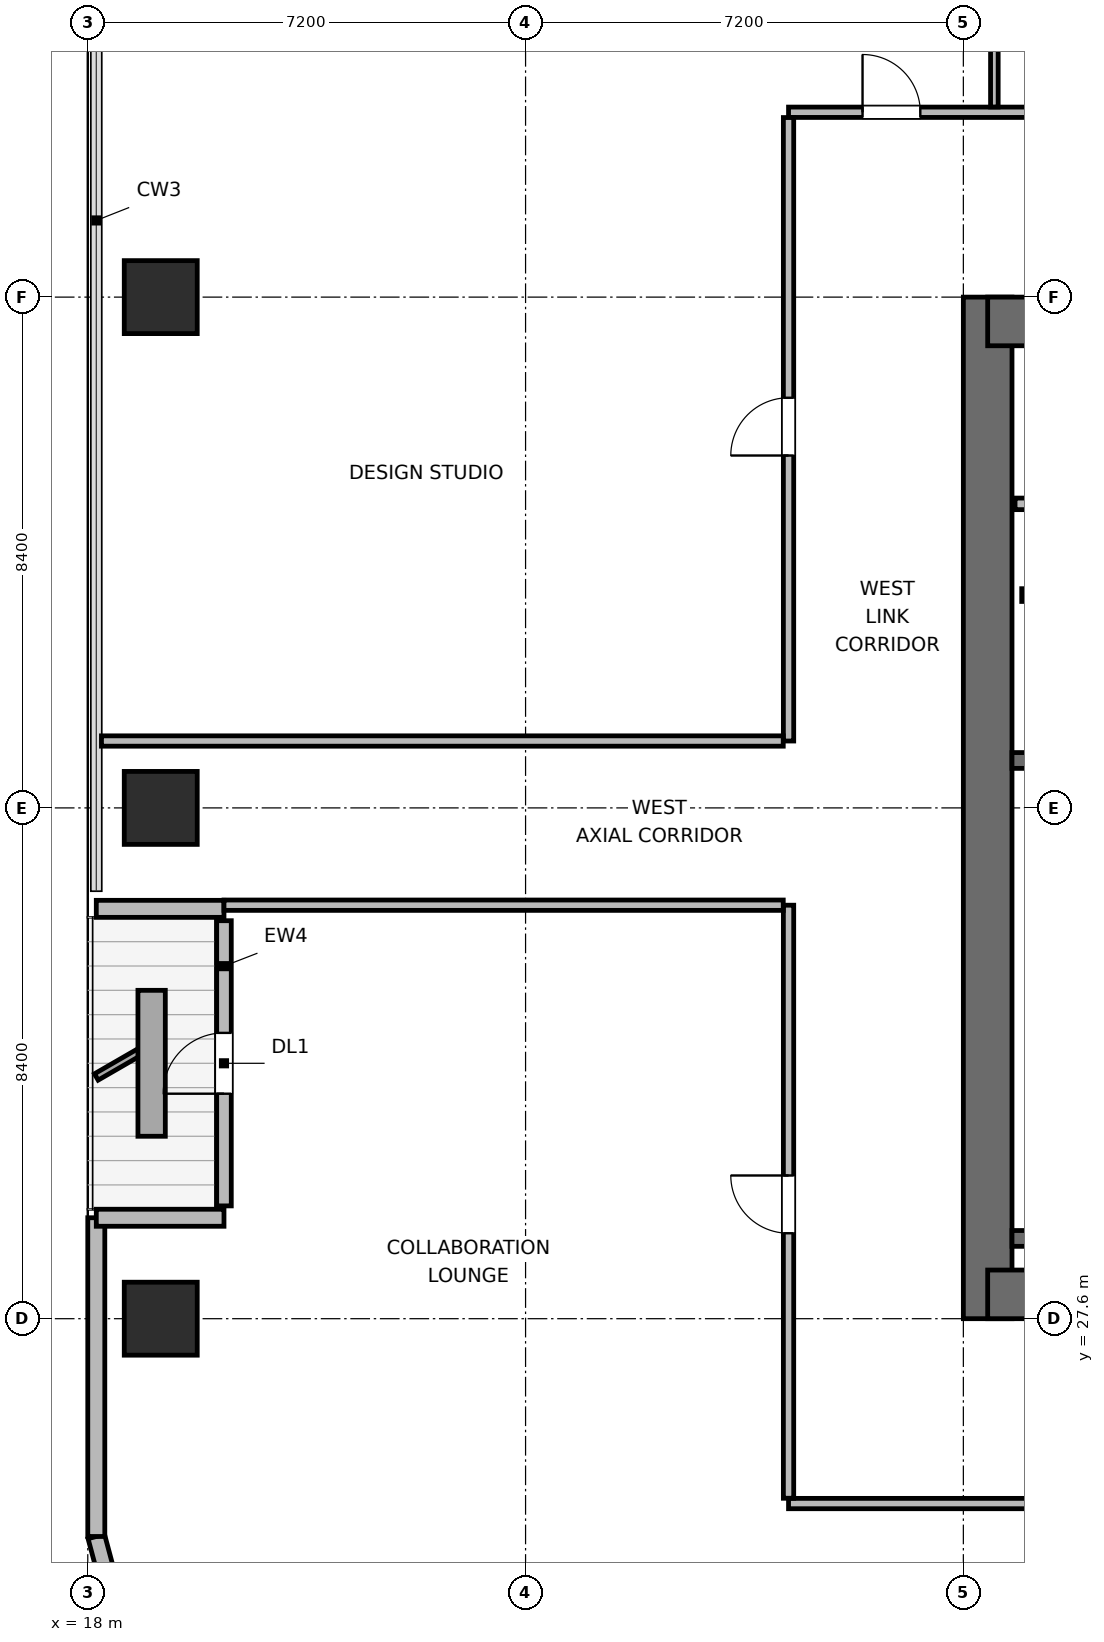
"""IFC4 building model, lengths in metres.
Left out: names, types, materials, properties, quantities, classifications, styles, units other than length and angle.
Written with IfcOpenShell. Run it as: python <this file> out.ifc"""

import sys

from ifc_helpers import new_model, si_unit, direction, frame, frame_2d, origin, origin_2d, place, context, subcontext, project, spatial, rectangle, extrude, element, fill, save


model = new_model("IFC4")
c1 = context("Model", 3, precision=1e-05, world=origin(), true_north=direction((0.0, 1.0)))
c2 = subcontext(c1, "Body", "Model", "MODEL_VIEW")
j1 = project(units=[si_unit("LENGTHUNIT", "METRE"), si_unit("PLANEANGLEUNIT", "RADIAN")], contexts=[c1])
p1 = place(None, origin())
s1 = spatial("IfcSite", under=j1, at=p1, CompositionType="ELEMENT")
p2 = place(p1, origin())
s2 = spatial("IfcBuilding", under=s1, at=p2, CompositionType="ELEMENT")
p3 = place(p2, frame((0.0, 0.0, 177.9)))
s3 = spatial("IfcBuildingStorey", under=s2, at=p3, CompositionType="ELEMENT", Elevation=177.9)
p4 = place(p3, frame((32.8, 27.6, 0.0), z_axis=(0.0, 0.0, 1.0), x_axis=(0.0, 1.0, 0.0)))
e1 = element("IfcWall", 1, at=p4, inside=s3, PredefinedType="SHEAR", context=c2, shape_type="SweptSolid", body=[
    extrude(rectangle(XDim=16.8, YDim=0.8, at=frame_2d((8.4, 0.0))), origin(), (0.0, 0.0, 1.0), 3.9),
])
p5 = place(p3, frame((32.8, 28.0, 0.0), z_axis=(0.0, 0.0, 1.0), x_axis=(1.0, 0.0, 0.0)))
e2 = element("IfcWall", 2, at=p5, inside=s3, PredefinedType="SHEAR", context=c2, shape_type="SweptSolid", body=[
    extrude(rectangle(XDim=9.2, YDim=0.8, at=frame_2d((4.6, 0.0))), origin(), (0.0, 0.0, 1.0), 3.9),
])
p6 = place(p5, frame((5.025, 0.0, 0.0)))
e3 = element("IfcOpeningElement", 3, at=p6, cuts=e2, PredefinedType="OPENING", context=c2, shape_type="SweptSolid", body=[
    extrude(rectangle(XDim=1.05, YDim=2.04, at=frame_2d((0.525, 1.02))), frame((0.0, 0.41, 0.0), z_axis=(0.0, -1.0, 0.0), x_axis=(1.0, 0.0, 0.0)), (0.0, 0.0, 1.0), 0.82),
])
p7 = place(p3, frame((32.8, 44.0, 0.0), z_axis=(0.0, 0.0, 1.0), x_axis=(1.0, 0.0, 0.0)))
e4 = element("IfcWall", 4, at=p7, inside=s3, PredefinedType="SHEAR", context=c2, shape_type="SweptSolid", body=[
    extrude(rectangle(XDim=9.2, YDim=0.8, at=frame_2d((4.6, 0.0))), origin(), (0.0, 0.0, 1.0), 3.9),
])
p8 = place(p7, frame((1.025, 0.0, 0.0)))
e5 = element("IfcOpeningElement", 5, at=p8, cuts=e4, PredefinedType="OPENING", context=c2, shape_type="SweptSolid", body=[
    extrude(rectangle(XDim=0.95, YDim=2.04, at=frame_2d((0.475, 1.02))), frame((0.0, 0.41, 0.0), z_axis=(0.0, -1.0, 0.0), x_axis=(1.0, 0.0, 0.0)), (0.0, 0.0, 1.0), 0.82),
])
p9 = place(p7, frame((4.275, 0.0, 0.0)))
e6 = element("IfcOpeningElement", 6, at=p9, cuts=e4, PredefinedType="OPENING", context=c2, shape_type="SweptSolid", body=[
    extrude(rectangle(XDim=0.9, YDim=2.02, at=frame_2d((0.45, 1.01))), frame((0.0, 0.41, 0.0), z_axis=(0.0, -1.0, 0.0), x_axis=(1.0, 0.0, 0.0)), (0.0, 0.0, 1.0), 0.82),
])
p10 = place(p7, frame((7.175, 0.0, 0.0)))
e7 = element("IfcOpeningElement", 7, at=p10, cuts=e4, PredefinedType="OPENING", context=c2, shape_type="SweptSolid", body=[
    extrude(rectangle(XDim=0.9, YDim=2.02, at=frame_2d((0.45, 1.01))), frame((0.0, 0.41, 0.0), z_axis=(0.0, -1.0, 0.0), x_axis=(1.0, 0.0, 0.0)), (0.0, 0.0, 1.0), 0.82),
])
for number, where, z_axis, x_axis in (
    (8, (33.2, 28.92, 0.0), (0.0, 0.0, 1.0), (1.0, 0.0, 0.0)),
    (9, (33.2, 36.78, 0.0), (0.0, 0.0, 1.0), (1.0, 0.0, 0.0)),
):
    element("IfcWall", number, at=place(p3, frame(where, z_axis=z_axis, x_axis=x_axis)), inside=s3, PredefinedType="SHEAR", context=c2, shape_type="SweptSolid", body=[
        extrude(rectangle(XDim=3.91, YDim=0.26, at=frame_2d((1.955, 0.0))), origin(), (0.0, 0.0, 1.0), 3.9),
    ])
for number, where, z_axis, x_axis in (
    (10, (19.2, 27.6, 0.0), (0.0, 0.0, 1.0), (1.0, 0.0, 0.0)),
    (11, (19.2, 36.0, 0.0), (0.0, 0.0, 1.0), (1.0, 0.0, 0.0)),
    (12, (19.2, 44.4, 0.0), (0.0, 0.0, 1.0), (1.0, 0.0, 0.0)),
):
    element("IfcColumn", number, at=place(p3, frame(where, z_axis=z_axis, x_axis=x_axis)), inside=s3, PredefinedType="COLUMN", context=c2, shape_type="SweptSolid", body=[
        extrude(rectangle(XDim=1.2, YDim=1.2, at=origin_2d()), origin(), (0.0, 0.0, 1.0), 3.9),
    ])
p11 = place(p3, frame((18.848, 21.373, 0.0), z_axis=(0.0, 0.0, 1.0), x_axis=(-0.258672222976, 0.9659651552, 0.0)))
e13 = element("IfcWall", 13, at=p11, inside=s3, PredefinedType="SOLIDWALL", context=c2, shape_type="SweptSolid", body=[
    extrude(rectangle(XDim=2.739, YDim=0.28, at=frame_2d((1.37, 0.0))), origin(), (0.0, 0.0, 1.0), 3.68),
])
p12 = place(p3, frame((18.14, 24.018, 0.0), z_axis=(0.0, 0.0, 1.0), x_axis=(0.0, 1.0, 0.0)))
e14 = element("IfcWall", 14, at=p12, inside=s3, PredefinedType="SOLIDWALL", context=c2, shape_type="SweptSolid", body=[
    extrude(rectangle(XDim=5.242, YDim=0.28, at=frame_2d((2.621, 0.0))), origin(), (0.0, 0.0, 1.0), 3.68),
])
p13 = place(p3, frame((18.14, 29.26, 0.0), z_axis=(0.0, 0.0, 1.0), x_axis=(1.0, 0.0, 0.0)))
e15 = element("IfcWall", 15, at=p13, inside=s3, PredefinedType="SOLIDWALL", context=c2, shape_type="SweptSolid", body=[
    extrude(rectangle(XDim=2.1, YDim=0.28, at=frame_2d((1.05, 0.0))), origin(), (0.0, 0.0, 1.0), 3.116),
])
p14 = place(p3, frame((20.24, 29.455, 0.0), z_axis=(0.0, 0.0, 1.0), x_axis=(0.0, 1.0, 0.0)))
e16 = element("IfcWall", 16, at=p14, inside=s3, PredefinedType="SOLIDWALL", context=c2, shape_type="SweptSolid", body=[
    extrude(rectangle(XDim=4.69, YDim=0.24, at=frame_2d((2.345, 0.0))), origin(), (0.0, 0.0, 1.0), 3.248),
])
p15 = place(p14, frame((1.845, 0.0, 0.0)))
e17 = element("IfcOpeningElement", 17, at=p15, cuts=e16, PredefinedType="OPENING", context=c2, shape_type="SweptSolid", body=[
    extrude(rectangle(XDim=1.0, YDim=2.02, at=frame_2d((0.5, 1.01))), frame((0.0, 0.13, 0.0), z_axis=(0.0, -1.0, 0.0), x_axis=(1.0, 0.0, 0.0)), (0.0, 0.0, 1.0), 0.26),
])
p16 = place(p3, frame((20.24, 34.34, 0.0), z_axis=(0.0, 0.0, 1.0), x_axis=(-1.0, 0.0, 0.0)))
e18 = element("IfcWall", 18, at=p16, inside=s3, PredefinedType="SOLIDWALL", context=c2, shape_type="SweptSolid", body=[
    extrude(rectangle(XDim=2.1, YDim=0.28, at=frame_2d((1.05, 0.0))), origin(), (0.0, 0.0, 1.0), 3.116),
])
p17 = place(p3, frame((33.25, 41.0, 0.0), z_axis=(0.0, 0.0, 1.0), x_axis=(1.0, 0.0, 0.0)))
e19 = element("IfcWall", 19, at=p17, inside=s3, PredefinedType="PLUMBINGWALL", context=c2, shape_type="SweptSolid", body=[
    extrude(rectangle(XDim=8.3, YDim=0.19, at=frame_2d((4.15, 0.0))), origin(), (0.0, 0.0, 1.0), 3.68),
])
p18 = place(p3, frame((33.36, 39.5, 0.0), z_axis=(0.0, 0.0, 1.0), x_axis=(1.0, 0.0, 0.0)))
e20 = element("IfcWall", 20, at=p18, inside=s3, PredefinedType="PARTITIONING", context=c2, shape_type="SweptSolid", body=[
    extrude(rectangle(XDim=1.86, YDim=0.21, at=frame_2d((0.93, 0.0))), origin(), (0.0, 0.0, 1.0), 3.68),
])
p19 = place(p3, frame((29.525, 24.56, 0.0), z_axis=(0.0, 0.0, 1.0), x_axis=(1.0, 0.0, 0.0)))
e21 = element("IfcWall", 21, at=p19, inside=s3, PredefinedType="PARTITIONING", context=c2, shape_type="SweptSolid", body=[
    extrude(rectangle(XDim=34.075, YDim=0.17, at=frame_2d((17.038, 0.0))), origin(), (0.0, 0.0, 1.0), 3.68),
])
p20 = place(p19, frame((5.403, 0.0, 0.0)))
e22 = element("IfcOpeningElement", 22, at=p20, cuts=e21, PredefinedType="OPENING", context=c2, shape_type="SweptSolid", body=[
    extrude(rectangle(XDim=0.95, YDim=2.04, at=frame_2d((0.475, 1.02))), frame((0.0, 0.095, 0.0), z_axis=(0.0, -1.0, 0.0), x_axis=(1.0, 0.0, 0.0)), (0.0, 0.0, 1.0), 0.19),
])
p21 = place(p19, frame((16.56, 0.0, 0.0)))
e23 = element("IfcOpeningElement", 23, at=p21, cuts=e21, PredefinedType="OPENING", context=c2, shape_type="SweptSolid", body=[
    extrude(rectangle(XDim=0.95, YDim=2.04, at=frame_2d((0.475, 1.02))), frame((0.0, 0.095, 0.0), z_axis=(0.0, -1.0, 0.0), x_axis=(1.0, 0.0, 0.0)), (0.0, 0.0, 1.0), 0.19),
])
p22 = place(p19, frame((27.72, 0.0, 0.0)))
e24 = element("IfcOpeningElement", 24, at=p22, cuts=e21, PredefinedType="OPENING", context=c2, shape_type="SweptSolid", body=[
    extrude(rectangle(XDim=0.95, YDim=2.04, at=frame_2d((0.475, 1.02))), frame((0.0, 0.095, 0.0), z_axis=(0.0, -1.0, 0.0), x_axis=(1.0, 0.0, 0.0)), (0.0, 0.0, 1.0), 0.19),
])
p23 = place(p3, frame((29.525, 47.44, 0.0), z_axis=(0.0, 0.0, 1.0), x_axis=(1.0, 0.0, 0.0)))
e25 = element("IfcWall", 25, at=p23, inside=s3, PredefinedType="PARTITIONING", context=c2, shape_type="SweptSolid", body=[
    extrude(rectangle(XDim=34.075, YDim=0.17, at=frame_2d((17.038, 0.0))), origin(), (0.0, 0.0, 1.0), 3.68),
])
p24 = place(p23, frame((1.217, 0.0, 0.0)))
e26 = element("IfcOpeningElement", 26, at=p24, cuts=e25, PredefinedType="OPENING", context=c2, shape_type="SweptSolid", body=[
    extrude(rectangle(XDim=0.95, YDim=2.04, at=frame_2d((0.475, 1.02))), frame((0.0, 0.095, 0.0), z_axis=(0.0, -1.0, 0.0), x_axis=(1.0, 0.0, 0.0)), (0.0, 0.0, 1.0), 0.19),
])
p25 = place(p23, frame((6.37, 0.0, 0.0)))
e27 = element("IfcOpeningElement", 27, at=p25, cuts=e25, PredefinedType="OPENING", context=c2, shape_type="SweptSolid", body=[
    extrude(rectangle(XDim=0.95, YDim=2.04, at=frame_2d((0.475, 1.02))), frame((0.0, 0.095, 0.0), z_axis=(0.0, -1.0, 0.0), x_axis=(1.0, 0.0, 0.0)), (0.0, 0.0, 1.0), 0.19),
])
p26 = place(p23, frame((12.01, 0.0, 0.0)))
e28 = element("IfcOpeningElement", 28, at=p26, cuts=e25, PredefinedType="OPENING", context=c2, shape_type="SweptSolid", body=[
    extrude(rectangle(XDim=0.95, YDim=2.04, at=frame_2d((0.475, 1.02))), frame((0.0, 0.095, 0.0), z_axis=(0.0, -1.0, 0.0), x_axis=(1.0, 0.0, 0.0)), (0.0, 0.0, 1.0), 0.19),
])
p27 = place(p23, frame((16.86, 0.0, 0.0)))
e29 = element("IfcOpeningElement", 29, at=p27, cuts=e25, PredefinedType="OPENING", context=c2, shape_type="SweptSolid", body=[
    extrude(rectangle(XDim=0.95, YDim=2.04, at=frame_2d((0.475, 1.02))), frame((0.0, 0.095, 0.0), z_axis=(0.0, -1.0, 0.0), x_axis=(1.0, 0.0, 0.0)), (0.0, 0.0, 1.0), 0.19),
])
p28 = place(p23, frame((20.965, 0.0, 0.0)))
e30 = element("IfcOpeningElement", 30, at=p28, cuts=e25, PredefinedType="OPENING", context=c2, shape_type="SweptSolid", body=[
    extrude(rectangle(XDim=0.95, YDim=2.04, at=frame_2d((0.475, 1.02))), frame((0.0, 0.095, 0.0), z_axis=(0.0, -1.0, 0.0), x_axis=(1.0, 0.0, 0.0)), (0.0, 0.0, 1.0), 0.19),
])
p29 = place(p23, frame((25.52, 0.0, 0.0)))
e31 = element("IfcOpeningElement", 31, at=p29, cuts=e25, PredefinedType="OPENING", context=c2, shape_type="SweptSolid", body=[
    extrude(rectangle(XDim=0.95, YDim=2.04, at=frame_2d((0.475, 1.02))), frame((0.0, 0.095, 0.0), z_axis=(0.0, -1.0, 0.0), x_axis=(1.0, 0.0, 0.0)), (0.0, 0.0, 1.0), 0.19),
])
p30 = place(p23, frame((31.12, 0.0, 0.0)))
e32 = element("IfcOpeningElement", 32, at=p30, cuts=e25, PredefinedType="OPENING", context=c2, shape_type="SweptSolid", body=[
    extrude(rectangle(XDim=0.95, YDim=2.04, at=frame_2d((0.475, 1.02))), frame((0.0, 0.095, 0.0), z_axis=(0.0, -1.0, 0.0), x_axis=(1.0, 0.0, 0.0)), (0.0, 0.0, 1.0), 0.19),
])
p31 = place(p3, frame((29.525, 24.647, 0.0), z_axis=(0.0, 0.0, 1.0), x_axis=(0.0, 1.0, 0.0)))
e33 = element("IfcWall", 33, at=p31, inside=s3, PredefinedType="PARTITIONING", context=c2, shape_type="SweptSolid", body=[
    extrude(rectangle(XDim=9.753, YDim=0.17, at=frame_2d((4.876, 0.0))), origin(), (0.0, 0.0, 1.0), 3.68),
])
p32 = place(p31, frame((4.358, 0.0, 0.0)))
e34 = element("IfcOpeningElement", 34, at=p32, cuts=e33, PredefinedType="OPENING", context=c2, shape_type="SweptSolid", body=[
    extrude(rectangle(XDim=0.95, YDim=2.04, at=frame_2d((0.475, 1.02))), frame((0.0, 0.095, 0.0), z_axis=(0.0, -1.0, 0.0), x_axis=(1.0, 0.0, 0.0)), (0.0, 0.0, 1.0), 0.19),
])
p33 = place(p3, frame((29.525, 37.1, 0.0), z_axis=(0.0, 0.0, 1.0), x_axis=(0.0, 1.0, 0.0)))
e35 = element("IfcWall", 35, at=p33, inside=s3, PredefinedType="PARTITIONING", context=c2, shape_type="SweptSolid", body=[
    extrude(rectangle(XDim=10.253, YDim=0.17, at=frame_2d((5.126, 0.0))), origin(), (0.0, 0.0, 1.0), 3.68),
])
p34 = place(p33, frame((4.695, 0.0, 0.0)))
e36 = element("IfcOpeningElement", 36, at=p34, cuts=e35, PredefinedType="OPENING", context=c2, shape_type="SweptSolid", body=[
    extrude(rectangle(XDim=0.95, YDim=2.04, at=frame_2d((0.475, 1.02))), frame((0.0, 0.095, 0.0), z_axis=(0.0, -1.0, 0.0), x_axis=(1.0, 0.0, 0.0)), (0.0, 0.0, 1.0), 0.19),
])
p35 = place(p3, frame((32.91, 47.527, 0.0), z_axis=(0.0, 0.0, 1.0), x_axis=(0.0, 1.0, 0.0)))
e37 = element("IfcWall", 37, at=p35, inside=s3, PredefinedType="PARTITIONING", context=c2, shape_type="SweptSolid", body=[
    extrude(rectangle(XDim=14.638, YDim=0.125, at=frame_2d((7.319, 0.0))), origin(), (0.0, 0.0, 1.0), 3.68),
])
p36 = place(p3, frame((20.24, 34.4, 0.0), z_axis=(0.0, 0.0, 1.0), x_axis=(1.0, 0.0, 0.0)))
e38 = element("IfcWall", 38, at=p36, inside=s3, PredefinedType="PARTITIONING", context=c2, shape_type="SweptSolid", body=[
    extrude(rectangle(XDim=9.198, YDim=0.17, at=frame_2d((4.599, 0.0))), origin(), (0.0, 0.0, 1.0), 3.68),
])
p37 = place(p3, frame((18.225, 37.1, 0.0), z_axis=(0.0, 0.0, 1.0), x_axis=(1.0, 0.0, 0.0)))
e39 = element("IfcWall", 39, at=p37, inside=s3, PredefinedType="PARTITIONING", context=c2, shape_type="SweptSolid", body=[
    extrude(rectangle(XDim=11.213, YDim=0.17, at=frame_2d((5.606, 0.0))), origin(), (0.0, 0.0, 1.0), 3.68),
])
p38 = place(p15, origin())
e40 = element("IfcDoor", 40, at=p38, inside=s3, OperationType="SINGLE_SWING_LEFT", PredefinedType="DOOR", context=c2, shape_type="SweptSolid", body=[
    extrude(rectangle(XDim=1.0, YDim=2.02, at=frame_2d((0.5, 1.01))), frame((0.0, 0.025, 0.0), z_axis=(0.0, -1.0, 0.0), x_axis=(1.0, 0.0, 0.0)), (0.0, 0.0, 1.0), 0.05),
])
fill(e17, e40)
p39 = place(p24, origin())
e41 = element("IfcDoor", 41, at=p39, inside=s3, OperationType="SINGLE_SWING_LEFT", PredefinedType="DOOR", context=c2, shape_type="SweptSolid", body=[
    extrude(rectangle(XDim=0.95, YDim=2.04, at=frame_2d((0.475, 1.02))), frame((0.0, 0.025, 0.0), z_axis=(0.0, -1.0, 0.0), x_axis=(1.0, 0.0, 0.0)), (0.0, 0.0, 1.0), 0.05),
])
fill(e26, e41)
p40 = place(p32, origin())
e42 = element("IfcDoor", 42, at=p40, inside=s3, OperationType="SINGLE_SWING_RIGHT", PredefinedType="DOOR", context=c2, shape_type="SweptSolid", body=[
    extrude(rectangle(XDim=0.95, YDim=2.04, at=frame_2d((0.475, 1.02))), frame((0.0, 0.025, 0.0), z_axis=(0.0, -1.0, 0.0), x_axis=(1.0, 0.0, 0.0)), (0.0, 0.0, 1.0), 0.05),
])
fill(e34, e42)
p41 = place(p34, origin())
e43 = element("IfcDoor", 43, at=p41, inside=s3, OperationType="SINGLE_SWING_LEFT", PredefinedType="DOOR", context=c2, shape_type="SweptSolid", body=[
    extrude(rectangle(XDim=0.95, YDim=2.04, at=frame_2d((0.475, 1.02))), frame((0.0, 0.025, 0.0), z_axis=(0.0, -1.0, 0.0), x_axis=(1.0, 0.0, 0.0)), (0.0, 0.0, 1.0), 0.05),
])
fill(e36, e43)
save(model, sys.argv[1])
